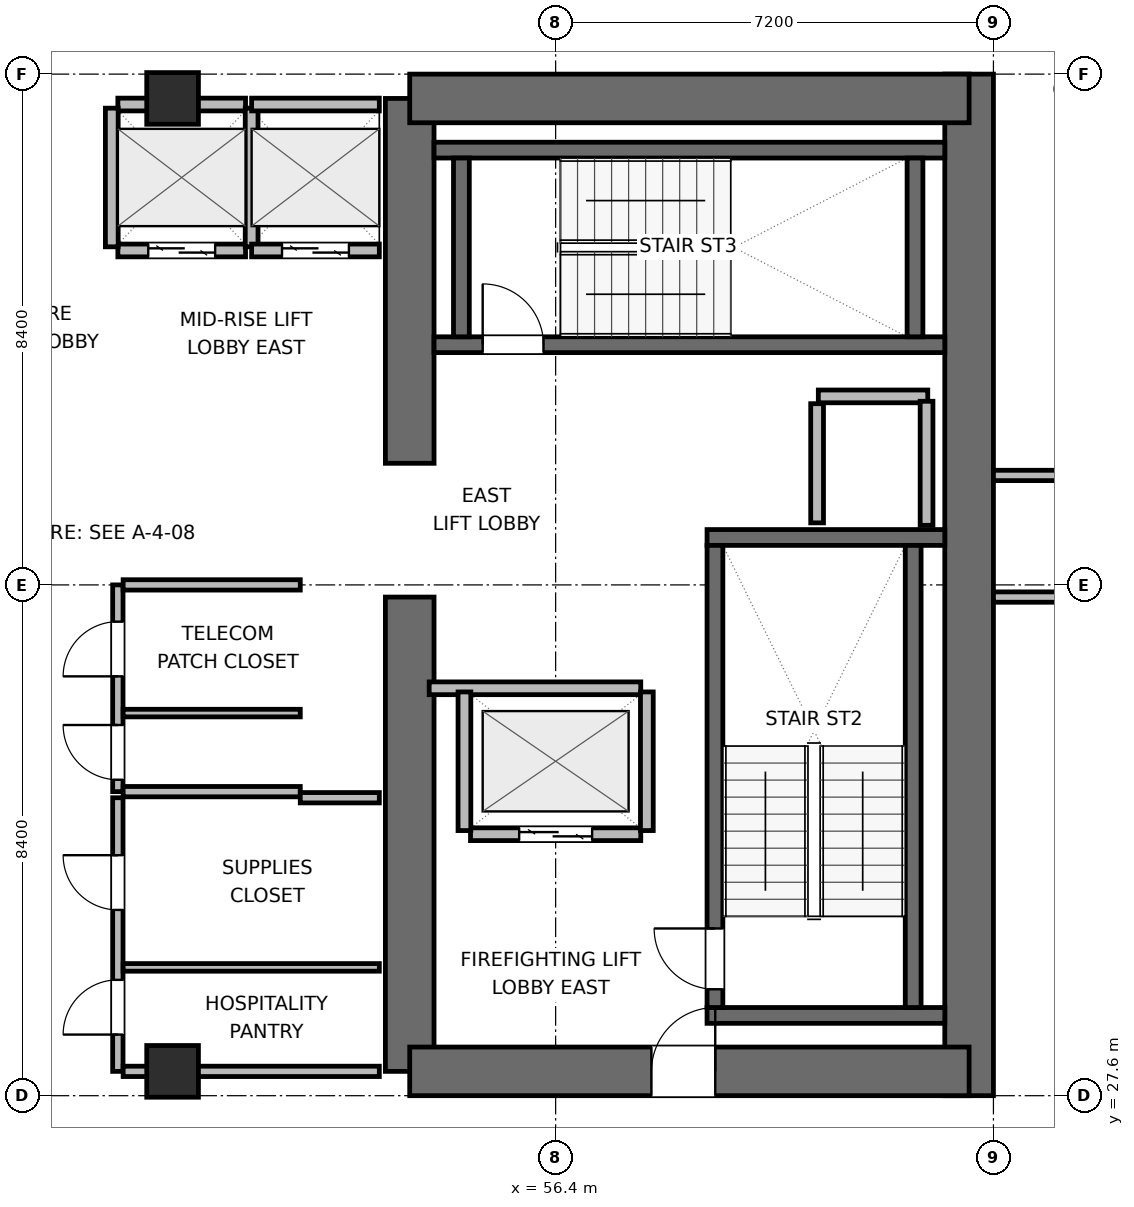
"""IFC4 building model, lengths in metres.
Left out: names, types, materials, properties, quantities, classifications, styles, units other than length and angle.
Written with IfcOpenShell. Run it as: python <this file> out.ifc"""

import sys

from ifc_helpers import new_model, si_unit, direction, frame, frame_2d, origin, origin_2d, place, context, subcontext, project, spatial, rectangle, extrude, element, fill, save


model = new_model("IFC4")
c1 = context("Model", 3, precision=1e-05, world=origin(), true_north=direction((0.0, 1.0)))
c2 = subcontext(c1, "Body", "Model", "MODEL_VIEW")
j1 = project(units=[si_unit("LENGTHUNIT", "METRE"), si_unit("PLANEANGLEUNIT", "RADIAN")], contexts=[c1])
p1 = place(None, origin())
s1 = spatial("IfcSite", under=j1, at=p1, CompositionType="ELEMENT")
p2 = place(p1, origin())
s2 = spatial("IfcBuilding", under=s1, at=p2, CompositionType="ELEMENT")
p3 = place(p2, frame((0.0, 0.0, 158.4)))
s3 = spatial("IfcBuildingStorey", under=s2, at=p3, CompositionType="ELEMENT", Elevation=158.4)
p4 = place(p3, frame((54.0, 28.0, 0.0), z_axis=(0.0, 0.0, 1.0), x_axis=(0.0, 1.0, 0.0)))
e1 = element("IfcWall", 1, at=p4, inside=s3, PredefinedType="SHEAR", context=c2, shape_type="SweptSolid", body=[
    extrude(rectangle(XDim=7.8, YDim=0.8, at=frame_2d((3.9, 0.0))), origin(), (0.0, 0.0, 1.0), 3.9),
])
p5 = place(p3, frame((54.0, 38.0, 0.0), z_axis=(0.0, 0.0, 1.0), x_axis=(0.0, 1.0, 0.0)))
e2 = element("IfcWall", 2, at=p5, inside=s3, PredefinedType="SHEAR", context=c2, shape_type="SweptSolid", body=[
    extrude(rectangle(XDim=6.0, YDim=0.8, at=frame_2d((3.0, 0.0))), origin(), (0.0, 0.0, 1.0), 3.9),
])
p6 = place(p3, frame((63.2, 27.6, 0.0), z_axis=(0.0, 0.0, 1.0), x_axis=(0.0, 1.0, 0.0)))
e3 = element("IfcWall", 3, at=p6, inside=s3, PredefinedType="SHEAR", context=c2, shape_type="SweptSolid", body=[
    extrude(rectangle(XDim=16.8, YDim=0.8, at=frame_2d((8.4, 0.0))), origin(), (0.0, 0.0, 1.0), 3.9),
])
p7 = place(p3, frame((54.0, 28.0, 0.0), z_axis=(0.0, 0.0, 1.0), x_axis=(1.0, 0.0, 0.0)))
e4 = element("IfcWall", 4, at=p7, inside=s3, PredefinedType="SHEAR", context=c2, shape_type="SweptSolid", body=[
    extrude(rectangle(XDim=9.2, YDim=0.8, at=frame_2d((4.6, 0.0))), origin(), (0.0, 0.0, 1.0), 3.9),
])
p8 = place(p7, frame((3.975, 0.0, 0.0)))
e5 = element("IfcOpeningElement", 5, at=p8, cuts=e4, PredefinedType="OPENING", context=c2, shape_type="SweptSolid", body=[
    extrude(rectangle(XDim=1.05, YDim=2.04, at=frame_2d((0.525, 1.02))), frame((0.0, 0.41, 0.0), z_axis=(0.0, -1.0, 0.0), x_axis=(1.0, 0.0, 0.0)), (0.0, 0.0, 1.0), 0.82),
])
p9 = place(p3, frame((54.0, 44.0, 0.0), z_axis=(0.0, 0.0, 1.0), x_axis=(1.0, 0.0, 0.0)))
e6 = element("IfcWall", 6, at=p9, inside=s3, PredefinedType="SHEAR", context=c2, shape_type="SweptSolid", body=[
    extrude(rectangle(XDim=9.2, YDim=0.8, at=frame_2d((4.6, 0.0))), origin(), (0.0, 0.0, 1.0), 3.9),
])
for number, where, z_axis, x_axis in (
    (7, (58.89, 28.92, 0.0), (0.0, 0.0, 1.0), (1.0, 0.0, 0.0)),
    (8, (58.89, 36.78, 0.0), (0.0, 0.0, 1.0), (1.0, 0.0, 0.0)),
):
    element("IfcWall", number, at=place(p3, frame(where, z_axis=z_axis, x_axis=x_axis)), inside=s3, PredefinedType="SHEAR", context=c2, shape_type="SweptSolid", body=[
        extrude(rectangle(XDim=3.91, YDim=0.26, at=frame_2d((1.955, 0.0))), origin(), (0.0, 0.0, 1.0), 3.9),
    ])
p10 = place(p3, frame((59.02, 29.05, 0.0), z_axis=(0.0, 0.0, 1.0), x_axis=(0.0, 1.0, 0.0)))
e9 = element("IfcWall", 9, at=p10, inside=s3, PredefinedType="SHEAR", context=c2, shape_type="SweptSolid", body=[
    extrude(rectangle(XDim=7.6, YDim=0.26, at=frame_2d((3.8, 0.0))), origin(), (0.0, 0.0, 1.0), 3.9),
])
p11 = place(p10, frame((0.3, 0.0, 0.0)))
e10 = element("IfcOpeningElement", 10, at=p11, cuts=e9, PredefinedType="OPENING", context=c2, shape_type="SweptSolid", body=[
    extrude(rectangle(XDim=1.0, YDim=2.04, at=frame_2d((0.5, 1.02))), frame((0.0, 0.14, 0.0), z_axis=(0.0, -1.0, 0.0), x_axis=(1.0, 0.0, 0.0)), (0.0, 0.0, 1.0), 0.28),
])
p12 = place(p3, frame((62.28, 29.05, 0.0), z_axis=(0.0, 0.0, 1.0), x_axis=(0.0, 1.0, 0.0)))
e11 = element("IfcWall", 11, at=p12, inside=s3, PredefinedType="SHEAR", context=c2, shape_type="SweptSolid", body=[
    extrude(rectangle(XDim=7.6, YDim=0.26, at=frame_2d((3.8, 0.0))), origin(), (0.0, 0.0, 1.0), 3.9),
])
p13 = place(p3, frame((54.4, 39.95, 0.0), z_axis=(0.0, 0.0, 1.0), x_axis=(1.0, 0.0, 0.0)))
e12 = element("IfcWall", 12, at=p13, inside=s3, PredefinedType="SHEAR", context=c2, shape_type="SweptSolid", body=[
    extrude(rectangle(XDim=8.4, YDim=0.26, at=frame_2d((4.2, 0.0))), origin(), (0.0, 0.0, 1.0), 3.9),
])
p14 = place(p13, frame((0.8, 0.0, 0.0)))
e13 = element("IfcOpeningElement", 13, at=p14, cuts=e12, PredefinedType="OPENING", context=c2, shape_type="SweptSolid", body=[
    extrude(rectangle(XDim=1.0, YDim=2.04, at=frame_2d((0.5, 1.02))), frame((0.0, 0.14, 0.0), z_axis=(0.0, -1.0, 0.0), x_axis=(1.0, 0.0, 0.0)), (0.0, 0.0, 1.0), 0.28),
])
p15 = place(p3, frame((54.4, 43.15, 0.0), z_axis=(0.0, 0.0, 1.0), x_axis=(1.0, 0.0, 0.0)))
e14 = element("IfcWall", 14, at=p15, inside=s3, PredefinedType="SHEAR", context=c2, shape_type="SweptSolid", body=[
    extrude(rectangle(XDim=8.4, YDim=0.26, at=frame_2d((4.2, 0.0))), origin(), (0.0, 0.0, 1.0), 3.9),
])
for number, where, z_axis, x_axis in (
    (15, (54.85, 40.08, 0.0), (0.0, 0.0, 1.0), (0.0, 1.0, 0.0)),
    (16, (62.31, 40.08, 0.0), (0.0, 0.0, 1.0), (0.0, 1.0, 0.0)),
):
    element("IfcWall", number, at=place(p3, frame(where, z_axis=z_axis, x_axis=x_axis)), inside=s3, PredefinedType="SHEAR", context=c2, shape_type="SweptSolid", body=[
        extrude(rectangle(XDim=2.94, YDim=0.26, at=frame_2d((1.47, 0.0))), origin(), (0.0, 0.0, 1.0), 3.9),
    ])
for number, where, z_axis, x_axis in (
    (17, (50.1, 28.0, 0.0), (0.0, 0.0, 1.0), (1.0, 0.0, 0.0)),
    (18, (50.1, 44.0, 0.0), (0.0, 0.0, 1.0), (1.0, 0.0, 0.0)),
):
    element("IfcColumn", number, at=place(p3, frame(where, z_axis=z_axis, x_axis=x_axis)), inside=s3, PredefinedType="COLUMN", context=c2, shape_type="SweptSolid", body=[
        extrude(rectangle(XDim=0.85, YDim=0.85, at=origin_2d()), origin(), (0.0, 0.0, 1.0), 3.9),
    ])
p16 = place(p3, frame((60.72, 39.1, 0.0), z_axis=(0.0, 0.0, 1.0), x_axis=(1.0, 0.0, 0.0)))
e19 = element("IfcWall", 19, at=p16, inside=s3, PredefinedType="PARTITIONING", context=c2, shape_type="SweptSolid", body=[
    extrude(rectangle(XDim=1.8, YDim=0.21, at=frame_2d((0.9, 0.0))), origin(), (0.0, 0.0, 1.0), 3.68),
])
p17 = place(p3, frame((60.7, 37.02, 0.0), z_axis=(0.0, 0.0, 1.0), x_axis=(0.0, 1.0, 0.0)))
e20 = element("IfcWall", 20, at=p17, inside=s3, PredefinedType="PARTITIONING", context=c2, shape_type="SweptSolid", body=[
    extrude(rectangle(XDim=1.96, YDim=0.21, at=frame_2d((0.98, 0.0))), origin(), (0.0, 0.0, 1.0), 3.68),
])
p18 = place(p3, frame((62.5, 36.98, 0.0), z_axis=(0.0, 0.0, 1.0), x_axis=(0.0, 1.0, 0.0)))
e21 = element("IfcWall", 21, at=p18, inside=s3, PredefinedType="PARTITIONING", context=c2, shape_type="SweptSolid", body=[
    extrude(rectangle(XDim=2.04, YDim=0.21, at=frame_2d((1.02, 0.0))), origin(), (0.0, 0.0, 1.0), 3.68),
])
p19 = place(p3, frame((55.0, 31.9, 0.0), z_axis=(0.0, 0.0, 1.0), x_axis=(1.0, 0.0, 0.0)))
e22 = element("IfcWall", 22, at=p19, inside=s3, PredefinedType="PARTITIONING", context=c2, shape_type="SweptSolid", body=[
    extrude(rectangle(XDim=2.8, YDim=0.21, at=frame_2d((1.4, 0.0))), origin(), (0.0, 0.0, 1.0), 3.68),
])
p20 = place(p19, frame((0.8, 0.0, 0.0)))
e23 = element("IfcOpeningElement", 23, at=p20, cuts=e22, PredefinedType="OPENING", context=c2, shape_type="SweptSolid", body=[
    extrude(rectangle(XDim=1.2, YDim=2.04, at=frame_2d((0.6, 1.02))), frame((0.0, 0.115, 0.0), z_axis=(0.0, -1.0, 0.0), x_axis=(1.0, 0.0, 0.0)), (0.0, 0.0, 1.0), 0.23),
])
p21 = place(p3, frame((54.32, 34.3, 0.0), z_axis=(0.0, 0.0, 1.0), x_axis=(1.0, 0.0, 0.0)))
e24 = element("IfcWall", 24, at=p21, inside=s3, PredefinedType="PARTITIONING", context=c2, shape_type="SweptSolid", body=[
    extrude(rectangle(XDim=3.48, YDim=0.21, at=frame_2d((1.74, 0.0))), origin(), (0.0, 0.0, 1.0), 3.68),
])
for number, where, z_axis, x_axis in (
    (25, (54.9, 31.96, 0.0), (0.0, 0.0, 1.0), (0.0, 1.0, 0.0)),
    (26, (57.9, 31.96, 0.0), (0.0, 0.0, 1.0), (0.0, 1.0, 0.0)),
):
    element("IfcWall", number, at=place(p3, frame(where, z_axis=z_axis, x_axis=x_axis)), inside=s3, PredefinedType="PARTITIONING", context=c2, shape_type="SweptSolid", body=[
        extrude(rectangle(XDim=2.28, YDim=0.21, at=frame_2d((1.14, 0.0))), origin(), (0.0, 0.0, 1.0), 3.68),
    ])
p22 = place(p3, frame((49.2, 41.5, 0.0), z_axis=(0.0, 0.0, 1.0), x_axis=(1.0, 0.0, 0.0)))
e27 = element("IfcWall", 27, at=p22, inside=s3, PredefinedType="PARTITIONING", context=c2, shape_type="SweptSolid", body=[
    extrude(rectangle(XDim=2.1, YDim=0.21, at=frame_2d((1.05, 0.0))), origin(), (0.0, 0.0, 1.0), 3.68),
])
p23 = place(p22, frame((0.5, 0.0, 0.0)))
e28 = element("IfcOpeningElement", 28, at=p23, cuts=e27, PredefinedType="OPENING", context=c2, shape_type="SweptSolid", body=[
    extrude(rectangle(XDim=1.1, YDim=2.04, at=frame_2d((0.55, 1.02))), frame((0.0, 0.115, 0.0), z_axis=(0.0, -1.0, 0.0), x_axis=(1.0, 0.0, 0.0)), (0.0, 0.0, 1.0), 0.23),
])
p24 = place(p3, frame((49.2, 43.9, 0.0), z_axis=(0.0, 0.0, 1.0), x_axis=(1.0, 0.0, 0.0)))
e29 = element("IfcWall", 29, at=p24, inside=s3, PredefinedType="PARTITIONING", context=c2, shape_type="SweptSolid", body=[
    extrude(rectangle(XDim=2.1, YDim=0.21, at=frame_2d((1.05, 0.0))), origin(), (0.0, 0.0, 1.0), 2.565),
])
for number, where, z_axis, x_axis in (
    (30, (49.1, 41.56, 0.0), (0.0, 0.0, 1.0), (0.0, 1.0, 0.0)),
    (31, (51.4, 41.56, 0.0), (0.0, 0.0, 1.0), (0.0, 1.0, 0.0)),
):
    element("IfcWall", number, at=place(p3, frame(where, z_axis=z_axis, x_axis=x_axis)), inside=s3, PredefinedType="PARTITIONING", context=c2, shape_type="SweptSolid", body=[
        extrude(rectangle(XDim=2.28, YDim=0.21, at=frame_2d((1.14, 0.0))), origin(), (0.0, 0.0, 1.0), 3.68),
    ])
p25 = place(p3, frame((51.4, 41.5, 0.0), z_axis=(0.0, 0.0, 1.0), x_axis=(1.0, 0.0, 0.0)))
e32 = element("IfcWall", 32, at=p25, inside=s3, PredefinedType="PARTITIONING", context=c2, shape_type="SweptSolid", body=[
    extrude(rectangle(XDim=2.1, YDim=0.21, at=frame_2d((1.05, 0.0))), origin(), (0.0, 0.0, 1.0), 3.68),
])
p26 = place(p25, frame((0.5, 0.0, 0.0)))
e33 = element("IfcOpeningElement", 33, at=p26, cuts=e32, PredefinedType="OPENING", context=c2, shape_type="SweptSolid", body=[
    extrude(rectangle(XDim=1.1, YDim=2.04, at=frame_2d((0.55, 1.02))), frame((0.0, 0.115, 0.0), z_axis=(0.0, -1.0, 0.0), x_axis=(1.0, 0.0, 0.0)), (0.0, 0.0, 1.0), 0.23),
])
p27 = place(p3, frame((51.4, 43.9, 0.0), z_axis=(0.0, 0.0, 1.0), x_axis=(1.0, 0.0, 0.0)))
e34 = element("IfcWall", 34, at=p27, inside=s3, PredefinedType="PARTITIONING", context=c2, shape_type="SweptSolid", body=[
    extrude(rectangle(XDim=2.1, YDim=0.21, at=frame_2d((1.05, 0.0))), origin(), (0.0, 0.0, 1.0), 2.565),
])
p28 = place(p3, frame((49.2, 32.6, 0.0), z_axis=(0.0, 0.0, 1.0), x_axis=(0.0, 1.0, 0.0)))
e35 = element("IfcWall", 35, at=p28, inside=s3, PredefinedType="PARTITIONING", context=c2, shape_type="SweptSolid", body=[
    extrude(rectangle(XDim=3.4, YDim=0.17, at=frame_2d((1.7, 0.0))), origin(), (0.0, 0.0, 1.0), 3.68),
])
p29 = place(p28, frame((0.196, 0.0, 0.0)))
e36 = element("IfcOpeningElement", 36, at=p29, cuts=e35, PredefinedType="OPENING", context=c2, shape_type="SweptSolid", body=[
    extrude(rectangle(XDim=0.9, YDim=2.02, at=frame_2d((0.45, 1.01))), frame((0.0, 0.095, 0.0), z_axis=(0.0, -1.0, 0.0), x_axis=(1.0, 0.0, 0.0)), (0.0, 0.0, 1.0), 0.19),
])
p30 = place(p28, frame((1.896, 0.0, 0.0)))
e37 = element("IfcOpeningElement", 37, at=p30, cuts=e35, PredefinedType="OPENING", context=c2, shape_type="SweptSolid", body=[
    extrude(rectangle(XDim=0.9, YDim=2.02, at=frame_2d((0.45, 1.01))), frame((0.0, 0.095, 0.0), z_axis=(0.0, -1.0, 0.0), x_axis=(1.0, 0.0, 0.0)), (0.0, 0.0, 1.0), 0.19),
])
for number, where, z_axis, x_axis in (
    (38, (49.287, 32.6, 0.0), (0.0, 0.0, 1.0), (1.0, 0.0, 0.0)),
    (39, (49.287, 36.0, 0.0), (0.0, 0.0, 1.0), (1.0, 0.0, 0.0)),
):
    element("IfcWall", number, at=place(p3, frame(where, z_axis=z_axis, x_axis=x_axis)), inside=s3, PredefinedType="PARTITIONING", context=c2, shape_type="SweptSolid", body=[
        extrude(rectangle(XDim=2.913, YDim=0.17, at=frame_2d((1.457, 0.0))), origin(), (0.0, 0.0, 1.0), 3.68),
    ])
p31 = place(p3, frame((49.287, 33.892, 0.0), z_axis=(0.0, 0.0, 1.0), x_axis=(1.0, 0.0, 0.0)))
e40 = element("IfcWall", 40, at=p31, inside=s3, PredefinedType="PARTITIONING", context=c2, shape_type="SweptSolid", body=[
    extrude(rectangle(XDim=2.913, YDim=0.125, at=frame_2d((1.457, 0.0))), origin(), (0.0, 0.0, 1.0), 3.68),
])
p32 = place(p3, frame((49.2, 28.0, 0.0), z_axis=(0.0, 0.0, 1.0), x_axis=(0.0, 1.0, 0.0)))
e41 = element("IfcWall", 41, at=p32, inside=s3, PredefinedType="PARTITIONING", context=c2, shape_type="SweptSolid", body=[
    extrude(rectangle(XDim=4.5, YDim=0.17, at=frame_2d((2.25, 0.0))), origin(), (0.0, 0.0, 1.0), 3.68),
])
p33 = place(p32, frame((0.605, 0.0, 0.0)))
e42 = element("IfcOpeningElement", 42, at=p33, cuts=e41, PredefinedType="OPENING", context=c2, shape_type="SweptSolid", body=[
    extrude(rectangle(XDim=0.9, YDim=2.02, at=frame_2d((0.45, 1.01))), frame((0.0, 0.095, 0.0), z_axis=(0.0, -1.0, 0.0), x_axis=(1.0, 0.0, 0.0)), (0.0, 0.0, 1.0), 0.19),
])
p34 = place(p32, frame((2.655, 0.0, 0.0)))
e43 = element("IfcOpeningElement", 43, at=p34, cuts=e41, PredefinedType="OPENING", context=c2, shape_type="SweptSolid", body=[
    extrude(rectangle(XDim=0.9, YDim=2.02, at=frame_2d((0.45, 1.01))), frame((0.0, 0.095, 0.0), z_axis=(0.0, -1.0, 0.0), x_axis=(1.0, 0.0, 0.0)), (0.0, 0.0, 1.0), 0.19),
])
p35 = place(p3, frame((49.287, 28.0, 0.0), z_axis=(0.0, 0.0, 1.0), x_axis=(1.0, 0.0, 0.0)))
e44 = element("IfcWall", 44, at=p35, inside=s3, PredefinedType="PARTITIONING", context=c2, shape_type="SweptSolid", body=[
    extrude(rectangle(XDim=4.213, YDim=0.17, at=frame_2d((2.106, 0.0))), origin(), (0.0, 0.0, 1.0), 2.565),
])
p36 = place(p3, frame((52.2, 32.5, 0.0), z_axis=(0.0, 0.0, 1.0), x_axis=(1.0, 0.0, 0.0)))
e45 = element("IfcWall", 45, at=p36, inside=s3, PredefinedType="PARTITIONING", context=c2, shape_type="SweptSolid", body=[
    extrude(rectangle(XDim=1.3, YDim=0.17, at=frame_2d((0.65, 0.0))), origin(), (0.0, 0.0, 1.0), 3.68),
])
p37 = place(p3, frame((49.287, 29.71, 0.0), z_axis=(0.0, 0.0, 1.0), x_axis=(1.0, 0.0, 0.0)))
e46 = element("IfcWall", 46, at=p37, inside=s3, PredefinedType="PARTITIONING", context=c2, shape_type="SweptSolid", body=[
    extrude(rectangle(XDim=4.213, YDim=0.125, at=frame_2d((2.106, 0.0))), origin(), (0.0, 0.0, 1.0), 3.68),
])
p38 = place(p3, frame((63.6, 35.8, 0.0), z_axis=(0.0, 0.0, 1.0), x_axis=(1.0, 0.0, 0.0)))
e47 = element("IfcWall", 47, at=p38, inside=s3, PredefinedType="PARTITIONING", context=c2, shape_type="SweptSolid", body=[
    extrude(rectangle(XDim=6.975, YDim=0.17, at=frame_2d((3.487, 0.0))), origin(), (0.0, 0.0, 1.0), 3.043),
])
p39 = place(p38, frame((1.1, 0.0, 0.0)))
e48 = element("IfcOpeningElement", 48, at=p39, cuts=e47, PredefinedType="OPENING", context=c2, shape_type="SweptSolid", body=[
    extrude(rectangle(XDim=0.95, YDim=2.04, at=frame_2d((0.475, 1.02))), frame((0.0, 0.095, 0.0), z_axis=(0.0, -1.0, 0.0), x_axis=(1.0, 0.0, 0.0)), (0.0, 0.0, 1.0), 0.19),
])
p40 = place(p3, frame((63.6, 37.8, 0.0), z_axis=(0.0, 0.0, 1.0), x_axis=(1.0, 0.0, 0.0)))
e49 = element("IfcWall", 49, at=p40, inside=s3, PredefinedType="PARTITIONING", context=c2, shape_type="SweptSolid", body=[
    extrude(rectangle(XDim=4.96, YDim=0.17, at=frame_2d((2.48, 0.0))), origin(), (0.0, 0.0, 1.0), 3.68),
])
p41 = place(p40, frame((1.1, 0.0, 0.0)))
e50 = element("IfcOpeningElement", 50, at=p41, cuts=e49, PredefinedType="OPENING", context=c2, shape_type="SweptSolid", body=[
    extrude(rectangle(XDim=0.95, YDim=2.04, at=frame_2d((0.475, 1.02))), frame((0.0, 0.095, 0.0), z_axis=(0.0, -1.0, 0.0), x_axis=(1.0, 0.0, 0.0)), (0.0, 0.0, 1.0), 0.19),
])
p42 = place(p11, origin())
e51 = element("IfcDoor", 51, at=p42, inside=s3, OperationType="SINGLE_SWING_RIGHT", PredefinedType="DOOR", context=c2, shape_type="SweptSolid", body=[
    extrude(rectangle(XDim=1.0, YDim=2.04, at=frame_2d((0.5, 1.02))), frame((0.0, 0.025, 0.0), z_axis=(0.0, -1.0, 0.0), x_axis=(1.0, 0.0, 0.0)), (0.0, 0.0, 1.0), 0.05),
])
fill(e10, e51)
p43 = place(p14, origin())
e52 = element("IfcDoor", 52, at=p43, inside=s3, OperationType="SINGLE_SWING_LEFT", PredefinedType="DOOR", context=c2, shape_type="SweptSolid", body=[
    extrude(rectangle(XDim=1.0, YDim=2.04, at=frame_2d((0.5, 1.02))), frame((0.0, 0.025, 0.0), z_axis=(0.0, -1.0, 0.0), x_axis=(1.0, 0.0, 0.0)), (0.0, 0.0, 1.0), 0.05),
])
fill(e13, e52)
p44 = place(p20, origin())
e53 = element("IfcDoor", 53, at=p44, inside=s3, OperationType="DOUBLE_DOOR_SLIDING", PredefinedType="DOOR", context=c2, shape_type="SweptSolid", body=[
    extrude(rectangle(XDim=1.2, YDim=2.04, at=frame_2d((0.6, 1.02))), frame((0.0, 0.025, 0.0), z_axis=(0.0, -1.0, 0.0), x_axis=(1.0, 0.0, 0.0)), (0.0, 0.0, 1.0), 0.05),
])
fill(e23, e53)
p45 = place(p23, origin())
e54 = element("IfcDoor", 54, at=p45, inside=s3, OperationType="DOUBLE_DOOR_SLIDING", PredefinedType="DOOR", context=c2, shape_type="SweptSolid", body=[
    extrude(rectangle(XDim=1.1, YDim=2.04, at=frame_2d((0.55, 1.02))), frame((0.0, 0.025, 0.0), z_axis=(0.0, -1.0, 0.0), x_axis=(1.0, 0.0, 0.0)), (0.0, 0.0, 1.0), 0.05),
])
fill(e28, e54)
p46 = place(p26, origin())
e55 = element("IfcDoor", 55, at=p46, inside=s3, OperationType="DOUBLE_DOOR_SLIDING", PredefinedType="DOOR", context=c2, shape_type="SweptSolid", body=[
    extrude(rectangle(XDim=1.1, YDim=2.04, at=frame_2d((0.55, 1.02))), frame((0.0, 0.025, 0.0), z_axis=(0.0, -1.0, 0.0), x_axis=(1.0, 0.0, 0.0)), (0.0, 0.0, 1.0), 0.05),
])
fill(e33, e55)
p47 = place(p8, origin())
e56 = element("IfcDoor", 56, at=p47, inside=s3, OperationType="SINGLE_SWING_RIGHT", PredefinedType="DOOR", context=c2, shape_type="SweptSolid", body=[
    extrude(rectangle(XDim=1.05, YDim=2.04, at=frame_2d((0.525, 1.02))), frame((0.0, 0.025, 0.0), z_axis=(0.0, -1.0, 0.0), x_axis=(1.0, 0.0, 0.0)), (0.0, 0.0, 1.0), 0.05),
])
fill(e5, e56)
p48 = place(p29, origin())
e57 = element("IfcDoor", 57, at=p48, inside=s3, OperationType="SINGLE_SWING_RIGHT", PredefinedType="DOOR", context=c2, shape_type="SweptSolid", body=[
    extrude(rectangle(XDim=0.9, YDim=2.02, at=frame_2d((0.45, 1.01))), frame((0.0, 0.025, 0.0), z_axis=(0.0, -1.0, 0.0), x_axis=(1.0, 0.0, 0.0)), (0.0, 0.0, 1.0), 0.05),
])
fill(e36, e57)
p49 = place(p30, origin())
e58 = element("IfcDoor", 58, at=p49, inside=s3, OperationType="SINGLE_SWING_LEFT", PredefinedType="DOOR", context=c2, shape_type="SweptSolid", body=[
    extrude(rectangle(XDim=0.9, YDim=2.02, at=frame_2d((0.45, 1.01))), frame((0.0, 0.025, 0.0), z_axis=(0.0, -1.0, 0.0), x_axis=(1.0, 0.0, 0.0)), (0.0, 0.0, 1.0), 0.05),
])
fill(e37, e58)
p50 = place(p33, origin())
e59 = element("IfcDoor", 59, at=p50, inside=s3, OperationType="SINGLE_SWING_LEFT", PredefinedType="DOOR", context=c2, shape_type="SweptSolid", body=[
    extrude(rectangle(XDim=0.9, YDim=2.02, at=frame_2d((0.45, 1.01))), frame((0.0, 0.025, 0.0), z_axis=(0.0, -1.0, 0.0), x_axis=(1.0, 0.0, 0.0)), (0.0, 0.0, 1.0), 0.05),
])
fill(e42, e59)
p51 = place(p34, origin())
e60 = element("IfcDoor", 60, at=p51, inside=s3, OperationType="SINGLE_SWING_RIGHT", PredefinedType="DOOR", context=c2, shape_type="SweptSolid", body=[
    extrude(rectangle(XDim=0.9, YDim=2.02, at=frame_2d((0.45, 1.01))), frame((0.0, 0.025, 0.0), z_axis=(0.0, -1.0, 0.0), x_axis=(1.0, 0.0, 0.0)), (0.0, 0.0, 1.0), 0.05),
])
fill(e43, e60)
save(model, sys.argv[1])
